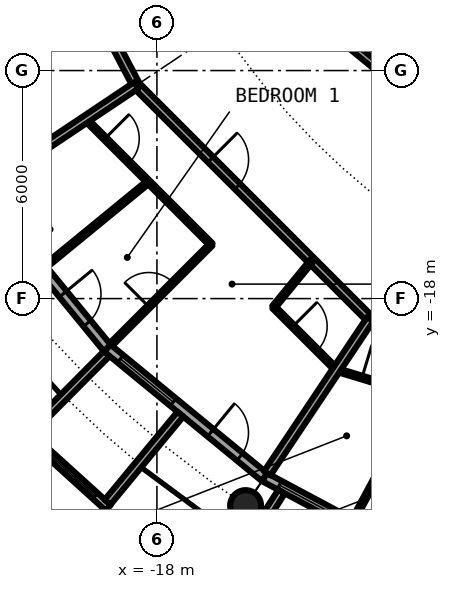
"""IFC4 building model, lengths in metres.
Left out: names, types, materials, properties, quantities, classifications, styles, units other than length and angle.
Written with IfcOpenShell. Run it as: python <this file> out.ifc"""

import sys

from ifc_helpers import new_model, si_unit, direction, frame, frame_2d, origin, origin_2d, place, context, subcontext, project, spatial, rectangle, circle, hollow_circle, extrude, element, fill, save


model = new_model("IFC4")
c1 = context("Model", 3, precision=1e-05, world=origin(), true_north=direction((0.0, 1.0)))
c2 = subcontext(c1, "Body", "Model", "MODEL_VIEW")
j1 = project(units=[si_unit("LENGTHUNIT", "METRE"), si_unit("PLANEANGLEUNIT", "RADIAN")], contexts=[c1])
p1 = place(None, origin())
s1 = spatial("IfcSite", under=j1, at=p1, CompositionType="ELEMENT")
p2 = place(p1, origin())
s2 = spatial("IfcBuilding", under=s1, at=p2, CompositionType="ELEMENT")
p3 = place(p2, frame((0.0, 0.0, 199.35)))
s3 = spatial("IfcBuildingStorey", under=s2, at=p3, CompositionType="ELEMENT", Elevation=199.35)
p4 = place(p3, frame((-15.667, -23.448, 0.0), z_axis=(0.0, 0.0, 1.0), x_axis=(1.0, 0.0, 0.0)))
e1 = element("IfcColumn", 1, at=p4, inside=s3, PredefinedType="COLUMN", context=c2, shape_type="SweptSolid", body=[
    extrude(hollow_circle(Radius=0.406, WallThickness=0.03, at=origin_2d()), origin(), (0.0, 0.0, 1.0), 3.05),
])
p5 = place(p3, frame((-22.699, -15.167, 0.0), z_axis=(0.0, 0.0, 1.0), x_axis=(0.634382322723, -0.773019449054, 0.0)))
e2 = element("IfcWall", 2, at=p5, inside=s3, PredefinedType="SOLIDWALL", context=c2, shape_type="SweptSolid", body=[
    extrude(rectangle(XDim=5.352, YDim=0.25, at=frame_2d((2.676, 0.0))), origin(), (0.0, 0.0, 1.0), 2.7),
])
p6 = place(p5, frame((0.441, 0.0, 0.3)))
e3 = element("IfcOpeningElement", 3, at=p6, cuts=e2, PredefinedType="OPENING", context=c2, shape_type="SweptSolid", body=[
    extrude(rectangle(XDim=1.8, YDim=2.1, at=frame_2d((0.9, 1.05))), frame((0.0, 0.135, 0.0), z_axis=(0.0, -1.0, 0.0), x_axis=(1.0, 0.0, 0.0)), (0.0, 0.0, 1.0), 0.27),
])
p7 = place(p5, frame((3.51, 0.0, 0.0)))
e4 = element("IfcOpeningElement", 4, at=p7, cuts=e2, PredefinedType="OPENING", context=c2, shape_type="SweptSolid", body=[
    extrude(rectangle(XDim=1.0, YDim=2.2, at=frame_2d((0.5, 1.1))), frame((0.0, 0.135, 0.0), z_axis=(0.0, -1.0, 0.0), x_axis=(1.0, 0.0, 0.0)), (0.0, 0.0, 1.0), 0.27),
])
p8 = place(p3, frame((-19.304, -19.304, 0.0), z_axis=(0.0, 0.0, 1.0), x_axis=(0.773019449054, -0.634382322723, 0.0)))
e5 = element("IfcWall", 5, at=p8, inside=s3, PredefinedType="SOLIDWALL", context=c2, shape_type="SweptSolid", body=[
    extrude(rectangle(XDim=5.352, YDim=0.25, at=frame_2d((2.676, 0.0))), origin(), (0.0, 0.0, 1.0), 2.7),
])
p9 = place(p8, frame((0.441, 0.0, 0.3)))
e6 = element("IfcOpeningElement", 6, at=p9, cuts=e5, PredefinedType="OPENING", context=c2, shape_type="SweptSolid", body=[
    extrude(rectangle(XDim=1.8, YDim=2.1, at=frame_2d((0.9, 1.05))), frame((0.0, 0.135, 0.0), z_axis=(0.0, -1.0, 0.0), x_axis=(1.0, 0.0, 0.0)), (0.0, 0.0, 1.0), 0.27),
])
p10 = place(p8, frame((3.51, 0.0, 0.0)))
e7 = element("IfcOpeningElement", 7, at=p10, cuts=e5, PredefinedType="OPENING", context=c2, shape_type="SweptSolid", body=[
    extrude(rectangle(XDim=1.0, YDim=2.2, at=frame_2d((0.5, 1.1))), frame((0.0, 0.135, 0.0), z_axis=(0.0, -1.0, 0.0), x_axis=(1.0, 0.0, 0.0)), (0.0, 0.0, 1.0), 0.27),
])
p11 = place(p3, frame((-21.5, -21.493, -0.03), z_axis=(0.0, 0.0, 1.0), x_axis=(0.740998365753, -0.671506829416, 0.0)))
e8 = element("IfcWall", 8, at=p11, inside=s3, PredefinedType="SOLIDWALL", context=c2, shape_type="SweptSolid", body=[
    extrude(rectangle(XDim=2.993, YDim=0.2, at=frame_2d((1.497, 0.0))), origin(), (0.0, 0.0, 1.0), 2.73),
])
p12 = place(p11, frame((0.457, 0.0, 0.33)))
e9 = element("IfcOpeningElement", 9, at=p12, cuts=e8, PredefinedType="OPENING", context=c2, shape_type="SweptSolid", body=[
    extrude(circle(Radius=1.04, at=frame_2d((1.04, 1.04))), frame((0.0, 0.11, 0.0), z_axis=(0.0, -1.0, 0.0), x_axis=(1.0, 0.0, 0.0)), (0.0, 0.0, 1.0), 0.22),
])
p13 = place(p3, frame((-19.323, -19.45, -0.03), z_axis=(0.0, 0.0, 1.0), x_axis=(-0.704476739375, -0.709727076896, 0.0)))
e10 = element("IfcWall", 10, at=p13, inside=s3, PredefinedType="SOLIDWALL", context=c2, shape_type="SweptSolid", body=[
    extrude(rectangle(XDim=2.883, YDim=0.2, at=frame_2d((1.441, 0.0))), origin(), (0.0, 0.0, 1.0), 2.73),
])
p14 = place(p3, frame((-17.384, -21.041, -0.03), z_axis=(0.0, 0.0, 1.0), x_axis=(-0.63709551667, -0.770784861449, 0.0)))
e11 = element("IfcWall", 11, at=p14, inside=s3, PredefinedType="SOLIDWALL", context=c2, shape_type="SweptSolid", body=[
    extrude(rectangle(XDim=3.006, YDim=0.2, at=frame_2d((1.503, 0.0))), origin(), (0.0, 0.0, 1.0), 2.73),
])
p15 = place(p3, frame((-15.167, -22.699, 0.0), z_axis=(0.0, 0.0, 1.0), x_axis=(0.881915646801, -0.471407246368, 0.0)))
e12 = element("IfcWall", 12, at=p15, inside=s3, PredefinedType="SOLIDWALL", context=c2, shape_type="SweptSolid", body=[
    extrude(rectangle(XDim=5.352, YDim=0.25, at=frame_2d((2.676, 0.0))), origin(), (0.0, 0.0, 1.0), 2.7),
])
p16 = place(p15, frame((0.441, 0.0, 0.3)))
e13 = element("IfcOpeningElement", 13, at=p16, cuts=e12, PredefinedType="OPENING", context=c2, shape_type="SweptSolid", body=[
    extrude(rectangle(XDim=1.8, YDim=2.1, at=frame_2d((0.9, 1.05))), frame((0.0, 0.135, 0.0), z_axis=(0.0, -1.0, 0.0), x_axis=(1.0, 0.0, 0.0)), (0.0, 0.0, 1.0), 0.27),
])
p17 = place(p15, frame((3.51, 0.0, 0.0)))
e14 = element("IfcOpeningElement", 14, at=p17, cuts=e12, PredefinedType="OPENING", context=c2, shape_type="SweptSolid", body=[
    extrude(rectangle(XDim=1.0, YDim=2.2, at=frame_2d((0.5, 1.1))), frame((0.0, 0.135, 0.0), z_axis=(0.0, -1.0, 0.0), x_axis=(1.0, 0.0, 0.0)), (0.0, 0.0, 1.0), 0.27),
])
p18 = place(p3, frame((-14.722, -23.079, -0.03), z_axis=(0.0, 0.0, 1.0), x_axis=(-0.537572179146, -0.843217737129, 0.0)))
e15 = element("IfcWall", 15, at=p18, inside=s3, PredefinedType="SOLIDWALL", context=c2, shape_type="SweptSolid", body=[
    extrude(rectangle(XDim=2.924, YDim=0.2, at=frame_2d((1.462, 0.0))), origin(), (0.0, 0.0, 1.0), 2.73),
])
p19 = place(p3, frame((-19.869, -13.285, 0.0), z_axis=(0.0, 0.0, 1.0), x_axis=(0.707290020325, -0.706923494552, 0.0)))
e16 = element("IfcWall", 16, at=p19, inside=s3, PredefinedType="PARTITIONING", context=c2, shape_type="SweptSolid", body=[
    extrude(rectangle(XDim=4.663, YDim=0.1, at=frame_2d((2.331, 0.0))), origin(), (0.0, 0.0, 1.0), 2.7),
])
p20 = place(p19, frame((0.712, 0.0, 0.0)))
e17 = element("IfcOpeningElement", 17, at=p20, cuts=e16, PredefinedType="OPENING", context=c2, shape_type="SweptSolid", body=[
    extrude(rectangle(XDim=0.9, YDim=2.3, at=frame_2d((0.45, 1.15))), frame((0.0, 0.06, 0.0), z_axis=(0.0, -1.0, 0.0), x_axis=(1.0, 0.0, 0.0)), (0.0, 0.0, 1.0), 0.12),
])
p21 = place(p3, frame((-14.927, -18.224, 0.0), z_axis=(0.0, 0.0, 1.0), x_axis=(0.707316201218, -0.706897299114, 0.0)))
e18 = element("IfcWall", 18, at=p21, inside=s3, PredefinedType="PARTITIONING", context=c2, shape_type="SweptSolid", body=[
    extrude(rectangle(XDim=2.331, YDim=0.1, at=frame_2d((1.166, 0.0))), origin(), (0.0, 0.0, 1.0), 2.7),
])
p22 = place(p21, frame((0.716, 0.0, 0.0)))
e19 = element("IfcOpeningElement", 19, at=p22, cuts=e18, PredefinedType="OPENING", context=c2, shape_type="SweptSolid", body=[
    extrude(rectangle(XDim=0.9, YDim=2.3, at=frame_2d((0.45, 1.15))), frame((0.0, 0.06, 0.0), z_axis=(0.0, -1.0, 0.0), x_axis=(1.0, 0.0, 0.0)), (0.0, 0.0, 1.0), 0.12),
])
p23 = place(p3, frame((-13.279, -19.874, 0.0), z_axis=(0.0, 0.0, 1.0), x_axis=(0.956989789119, -0.290121601266, 0.0)))
e20 = element("IfcWall", 20, at=p23, inside=s3, PredefinedType="PARTITIONING", context=c2, shape_type="SweptSolid", body=[
    extrude(rectangle(XDim=6.942, YDim=0.1, at=frame_2d((3.471, 0.0))), origin(), (0.0, 0.0, 1.0), 2.7),
])
p24 = place(p23, frame((3.022, 0.0, 0.0)))
e21 = element("IfcOpeningElement", 21, at=p24, cuts=e20, PredefinedType="OPENING", context=c2, shape_type="SweptSolid", body=[
    extrude(rectangle(XDim=0.9, YDim=2.3, at=frame_2d((0.45, 1.15))), frame((0.0, 0.06, 0.0), z_axis=(0.0, -1.0, 0.0), x_axis=(1.0, 0.0, 0.0)), (0.0, 0.0, 1.0), 0.12),
])
p25 = place(p23, frame((0.705, 0.0, 0.0)))
e22 = element("IfcOpeningElement", 22, at=p25, cuts=e20, PredefinedType="OPENING", context=c2, shape_type="SweptSolid", body=[
    extrude(rectangle(XDim=0.9, YDim=2.3, at=frame_2d((0.45, 1.15))), frame((0.0, 0.06, 0.0), z_axis=(0.0, -1.0, 0.0), x_axis=(1.0, 0.0, 0.0)), (0.0, 0.0, 1.0), 0.12),
])
p26 = place(p3, frame((-19.317, -10.915, 0.0), z_axis=(0.0, 0.0, 1.0), x_axis=(0.465359652486, -0.885121683068, 0.0)))
e23 = element("IfcWall", 23, at=p26, inside=s3, PredefinedType="PARTITIONING", context=c2, shape_type="SweptSolid", body=[
    extrude(rectangle(XDim=1.665, YDim=0.2, at=frame_2d((0.833, 0.0))), origin(), (0.0, 0.0, 1.0), 2.7),
])
p27 = place(p3, frame((-18.542, -12.389, 0.0), z_axis=(0.0, 0.0, 1.0), x_axis=(0.707106781187, -0.707106781187, 0.0)))
e24 = element("IfcWall", 24, at=p27, inside=s3, PredefinedType="PARTITIONING", context=c2, shape_type="SweptSolid", body=[
    extrude(rectangle(XDim=8.702, YDim=0.2, at=frame_2d((4.351, 0.0))), origin(), (0.0, 0.0, 1.0), 2.7),
])
p28 = place(p27, frame((2.763, 0.0, 0.0)))
e25 = element("IfcOpeningElement", 25, at=p28, cuts=e24, PredefinedType="OPENING", context=c2, shape_type="SweptSolid", body=[
    extrude(rectangle(XDim=1.0, YDim=2.3, at=frame_2d((0.5, 1.15))), frame((0.0, 0.11, 0.0), z_axis=(0.0, -1.0, 0.0), x_axis=(1.0, 0.0, 0.0)), (0.0, 0.0, 1.0), 0.22),
])
p29 = place(p3, frame((-12.389, -18.542, 0.0), z_axis=(0.0, 0.0, 1.0), x_axis=(0.956942051091, -0.290279022415, 0.0)))
e26 = element("IfcWall", 26, at=p29, inside=s3, PredefinedType="PARTITIONING", context=c2, shape_type="SweptSolid", body=[
    extrude(rectangle(XDim=12.946, YDim=0.2, at=frame_2d((6.473, 0.0))), origin(), (0.0, 0.0, 1.0), 2.7),
])
p30 = place(p29, frame((4.895, 0.0, 0.0)))
e27 = element("IfcOpeningElement", 27, at=p30, cuts=e26, PredefinedType="OPENING", context=c2, shape_type="SweptSolid", body=[
    extrude(rectangle(XDim=1.0, YDim=2.3, at=frame_2d((0.5, 1.15))), frame((0.0, 0.11, 0.0), z_axis=(0.0, -1.0, 0.0), x_axis=(1.0, 0.0, 0.0)), (0.0, 0.0, 1.0), 0.22),
])
p31 = place(p3, frame((-14.717, -9.834, 0.0), z_axis=(0.0, 0.0, 1.0), x_axis=(0.773034536097, -0.634363938131, 0.0)))
e28 = element("IfcWall", 28, at=p31, inside=s3, PredefinedType="PARTITIONING", context=c2, shape_type="SweptSolid", body=[
    extrude(rectangle(XDim=10.277, YDim=0.2, at=frame_2d((5.138, 0.0))), origin(), (0.0, 0.0, 1.0), 2.7),
])
p32 = place(p31, frame((4.638, 0.0, 0.0)))
e29 = element("IfcOpeningElement", 29, at=p32, cuts=e28, PredefinedType="OPENING", context=c2, shape_type="SweptSolid", body=[
    extrude(rectangle(XDim=1.0, YDim=2.3, at=frame_2d((0.5, 1.15))), frame((0.0, 0.11, 0.0), z_axis=(0.0, -1.0, 0.0), x_axis=(1.0, 0.0, 0.0)), (0.0, 0.0, 1.0), 0.22),
])
p33 = place(p3, frame((-14.927, -18.224, 0.0), z_axis=(0.0, 0.0, 1.0), x_axis=(0.633861186344, 0.773446828454, 0.0)))
e30 = element("IfcWall", 30, at=p33, inside=s3, PredefinedType="PARTITIONING", context=c2, shape_type="SweptSolid", body=[
    extrude(rectangle(XDim=1.578, YDim=0.1, at=frame_2d((0.789, 0.0))), origin(), (0.0, 0.0, 1.0), 2.7),
])
p34 = place(p3, frame((-22.595, -15.098, 0.0), z_axis=(0.0, 0.0, 1.0), x_axis=(0.831387096605, 0.55569370664, 0.0)))
e31 = element("IfcWall", 31, at=p34, inside=s3, PredefinedType="PARTITIONING", context=c2, shape_type="SweptSolid", body=[
    extrude(rectangle(XDim=4.875, YDim=0.2, at=frame_2d((2.438, 0.0))), origin(), (0.0, 0.0, 1.0), 2.7),
])
p35 = place(p3, frame((-21.023, -17.22, 0.0), z_axis=(0.0, 0.0, 1.0), x_axis=(0.773548271597, 0.633737383709, 0.0)))
e32 = element("IfcWall", 32, at=p35, inside=s3, PredefinedType="PARTITIONING", context=c2, shape_type="SweptSolid", body=[
    extrude(rectangle(XDim=3.618, YDim=0.1, at=frame_2d((1.809, 0.0))), origin(), (0.0, 0.0, 1.0), 2.7),
])
p36 = place(p3, frame((-19.216, -19.216, 0.0), z_axis=(0.0, 0.0, 1.0), x_axis=(0.707106781187, 0.707106781187, 0.0)))
e33 = element("IfcWall", 33, at=p36, inside=s3, PredefinedType="PARTITIONING", context=c2, shape_type="SweptSolid", body=[
    extrude(rectangle(XDim=3.735, YDim=0.1, at=frame_2d((1.868, 0.0))), origin(), (0.0, 0.0, 1.0), 2.7),
])
p37 = place(p36, frame((1.417, 0.0, 0.0)))
e34 = element("IfcOpeningElement", 34, at=p37, cuts=e33, PredefinedType="OPENING", context=c2, shape_type="SweptSolid", body=[
    extrude(rectangle(XDim=0.9, YDim=2.3, at=frame_2d((0.45, 1.15))), frame((0.0, 0.06, 0.0), z_axis=(0.0, -1.0, 0.0), x_axis=(1.0, 0.0, 0.0)), (0.0, 0.0, 1.0), 0.12),
])
p38 = place(p3, frame((-15.096, -22.596, 0.0), z_axis=(0.0, 0.0, 1.0), x_axis=(0.55555521993, 0.831479643532, 0.0)))
e35 = element("IfcWall", 35, at=p38, inside=s3, PredefinedType="PARTITIONING", context=c2, shape_type="SweptSolid", body=[
    extrude(rectangle(XDim=4.875, YDim=0.2, at=frame_2d((2.437, 0.0))), origin(), (0.0, 0.0, 1.0), 2.7),
])
p39 = place(p3, frame((-12.887, -23.925, 0.0), z_axis=(0.0, 0.0, 1.0), x_axis=(0.474281720599, 0.88037313084, 0.0)))
e36 = element("IfcWall", 36, at=p39, inside=s3, PredefinedType="PARTITIONING", context=c2, shape_type="SweptSolid", body=[
    extrude(rectangle(XDim=3.842, YDim=0.1, at=frame_2d((1.921, 0.0))), origin(), (0.0, 0.0, 1.0), 2.7),
])
p40 = place(p7, origin())
e37 = element("IfcDoor", 37, at=p40, inside=s3, OperationType="SINGLE_SWING_LEFT", PredefinedType="DOOR", context=c2, shape_type="SweptSolid", body=[
    extrude(rectangle(XDim=1.0, YDim=2.2, at=frame_2d((0.5, 1.1))), frame((0.0, 0.025, 0.0), z_axis=(0.0, -1.0, 0.0), x_axis=(1.0, 0.0, 0.0)), (0.0, 0.0, 1.0), 0.05),
])
fill(e4, e37)
p41 = place(p9, origin())
e38 = element("IfcWindow", 38, at=p41, inside=s3, PartitioningType="SINGLE_PANEL", PredefinedType="WINDOW", context=c2, shape_type="SweptSolid", body=[
    extrude(rectangle(XDim=1.8, YDim=2.1, at=frame_2d((0.9, 1.05))), frame((0.0, 0.03, 0.0), z_axis=(0.0, -1.0, 0.0), x_axis=(1.0, 0.0, 0.0)), (0.0, 0.0, 1.0), 0.06),
])
fill(e6, e38)
p42 = place(p12, origin())
e39 = element("IfcWindow", 39, at=p42, inside=s3, PartitioningType="SINGLE_PANEL", PredefinedType="WINDOW", context=c2, shape_type="SweptSolid", body=[
    extrude(circle(Radius=1.04, at=frame_2d((1.04, 1.04))), frame((0.0, 0.03, 0.0), z_axis=(0.0, -1.0, 0.0), x_axis=(1.0, 0.0, 0.0)), (0.0, 0.0, 1.0), 0.06),
])
fill(e9, e39)
p43 = place(p10, origin())
e40 = element("IfcDoor", 40, at=p43, inside=s3, OperationType="SINGLE_SWING_LEFT", PredefinedType="DOOR", context=c2, shape_type="SweptSolid", body=[
    extrude(rectangle(XDim=1.0, YDim=2.2, at=frame_2d((0.5, 1.1))), frame((0.0, 0.025, 0.0), z_axis=(0.0, -1.0, 0.0), x_axis=(1.0, 0.0, 0.0)), (0.0, 0.0, 1.0), 0.05),
])
fill(e7, e40)
p44 = place(p16, origin())
e41 = element("IfcWindow", 41, at=p44, inside=s3, PartitioningType="SINGLE_PANEL", PredefinedType="WINDOW", context=c2, shape_type="SweptSolid", body=[
    extrude(rectangle(XDim=1.8, YDim=2.1, at=frame_2d((0.9, 1.05))), frame((0.0, 0.03, 0.0), z_axis=(0.0, -1.0, 0.0), x_axis=(1.0, 0.0, 0.0)), (0.0, 0.0, 1.0), 0.06),
])
fill(e13, e41)
p45 = place(p28, origin())
e42 = element("IfcDoor", 42, at=p45, inside=s3, OperationType="SINGLE_SWING_LEFT", PredefinedType="DOOR", context=c2, shape_type="SweptSolid", body=[
    extrude(rectangle(XDim=1.0, YDim=2.3, at=frame_2d((0.5, 1.15))), frame((0.0, 0.025, 0.0), z_axis=(0.0, -1.0, 0.0), x_axis=(1.0, 0.0, 0.0)), (0.0, 0.0, 1.0), 0.05),
])
fill(e25, e42)
p46 = place(p22, origin())
e43 = element("IfcDoor", 43, at=p46, inside=s3, OperationType="SINGLE_SWING_LEFT", PredefinedType="DOOR", context=c2, shape_type="SweptSolid", body=[
    extrude(rectangle(XDim=0.9, YDim=2.3, at=frame_2d((0.45, 1.15))), frame((0.0, 0.025, 0.0), z_axis=(0.0, -1.0, 0.0), x_axis=(1.0, 0.0, 0.0)), (0.0, 0.0, 1.0), 0.05),
])
fill(e19, e43)
p47 = place(p37, origin())
e44 = element("IfcDoor", 44, at=p47, inside=s3, OperationType="SINGLE_SWING_LEFT", PredefinedType="DOOR", context=c2, shape_type="SweptSolid", body=[
    extrude(rectangle(XDim=0.9, YDim=2.3, at=frame_2d((0.45, 1.15))), frame((0.0, 0.025, 0.0), z_axis=(0.0, -1.0, 0.0), x_axis=(1.0, 0.0, 0.0)), (0.0, 0.0, 1.0), 0.05),
])
fill(e34, e44)
p48 = place(p20, origin())
e45 = element("IfcDoor", 45, at=p48, inside=s3, OperationType="SINGLE_SWING_LEFT", PredefinedType="DOOR", context=c2, shape_type="SweptSolid", body=[
    extrude(rectangle(XDim=0.9, YDim=2.3, at=frame_2d((0.45, 1.15))), frame((0.0, 0.025, 0.0), z_axis=(0.0, -1.0, 0.0), x_axis=(1.0, 0.0, 0.0)), (0.0, 0.0, 1.0), 0.05),
])
fill(e17, e45)
p49 = place(p25, origin())
e46 = element("IfcDoor", 46, at=p49, inside=s3, OperationType="SINGLE_SWING_LEFT", PredefinedType="DOOR", context=c2, shape_type="SweptSolid", body=[
    extrude(rectangle(XDim=0.9, YDim=2.3, at=frame_2d((0.45, 1.15))), frame((0.0, 0.025, 0.0), z_axis=(0.0, -1.0, 0.0), x_axis=(1.0, 0.0, 0.0)), (0.0, 0.0, 1.0), 0.05),
])
fill(e22, e46)
save(model, sys.argv[1])
